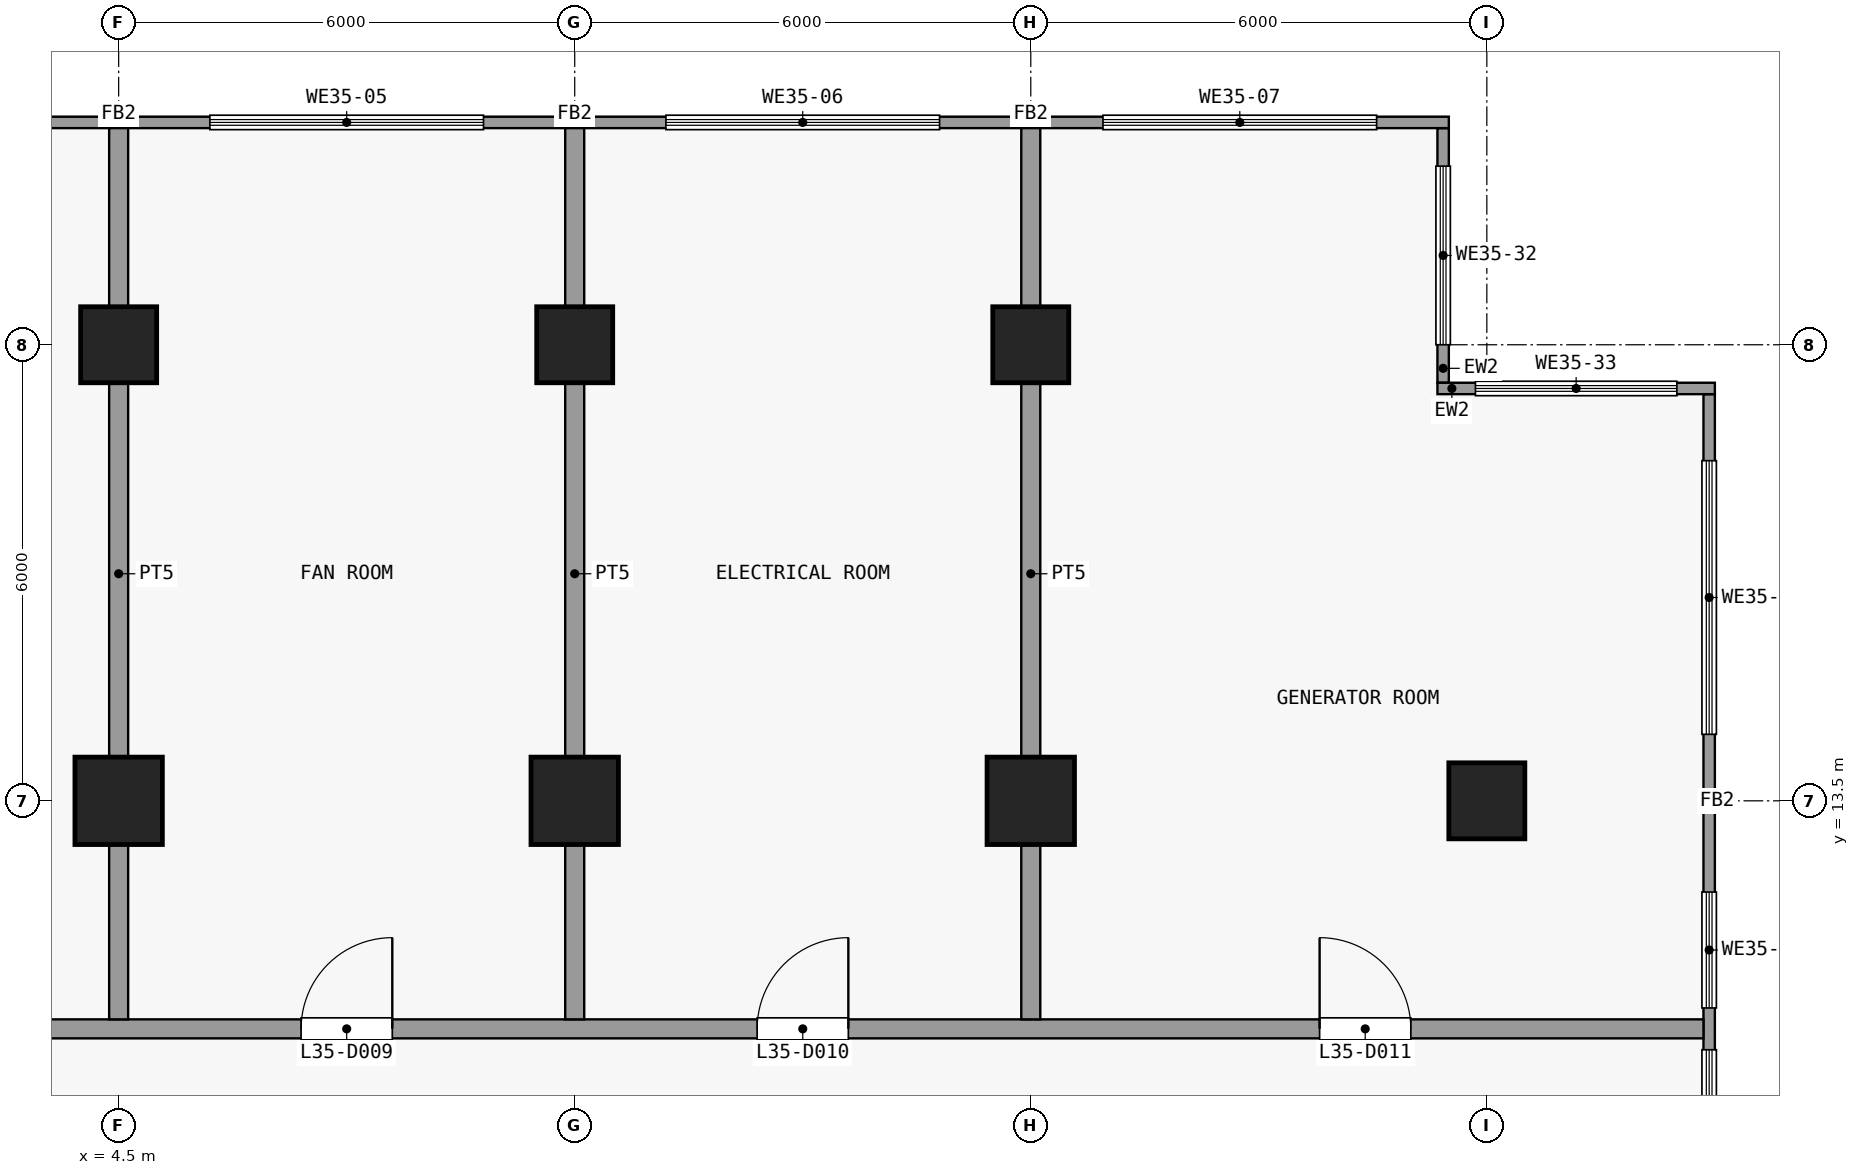
"""IFC4 building model, lengths in metres.
Left out: names, types, materials, properties, quantities, classifications, styles, units other than length and angle.
Written with IfcOpenShell. Run it as: python <this file> out.ifc"""

import sys

from ifc_helpers import new_model, si_unit, direction, frame, frame_2d, origin, origin_2d, place, context, subcontext, project, spatial, rectangle, extrude, element, fill, save


model = new_model("IFC4")
c1 = context("Model", 3, precision=1e-05, world=origin(), true_north=direction((0.0, 1.0)))
c2 = subcontext(c1, "Body", "Model", "MODEL_VIEW")
j1 = project(units=[si_unit("LENGTHUNIT", "METRE"), si_unit("PLANEANGLEUNIT", "RADIAN")], contexts=[c1])
p1 = place(None, origin())
s1 = spatial("IfcSite", under=j1, at=p1, CompositionType="ELEMENT")
p2 = place(p1, origin())
s2 = spatial("IfcBuilding", under=s1, at=p2, CompositionType="ELEMENT")
p3 = place(p2, frame((0.0, 0.0, 143.9)))
s3 = spatial("IfcBuildingStorey", under=s2, at=p3, CompositionType="ELEMENT", Elevation=143.9)
p4 = place(p3, frame((4.5, 13.5, 0.0), z_axis=(0.0, 0.0, 1.0), x_axis=(1.0, 0.0, 0.0)))
e1 = element("IfcColumn", 1, at=p4, inside=s3, PredefinedType="COLUMN", context=c2, shape_type="SweptSolid", body=[
    extrude(rectangle(XDim=1.15, YDim=1.15, at=origin_2d()), origin(), (0.0, 0.0, 1.0), 5.4),
])
p5 = place(p3, frame((4.5, 19.5, 0.0), z_axis=(0.0, 0.0, 1.0), x_axis=(1.0, 0.0, 0.0)))
e2 = element("IfcColumn", 2, at=p5, inside=s3, PredefinedType="COLUMN", context=c2, shape_type="SweptSolid", body=[
    extrude(rectangle(XDim=1.0, YDim=1.0, at=origin_2d()), origin(), (0.0, 0.0, 1.0), 5.4),
])
p6 = place(p3, frame((10.5, 13.5, 0.0), z_axis=(0.0, 0.0, 1.0), x_axis=(1.0, 0.0, 0.0)))
e3 = element("IfcColumn", 3, at=p6, inside=s3, PredefinedType="COLUMN", context=c2, shape_type="SweptSolid", body=[
    extrude(rectangle(XDim=1.15, YDim=1.15, at=origin_2d()), origin(), (0.0, 0.0, 1.0), 5.4),
])
p7 = place(p3, frame((10.5, 19.5, 0.0), z_axis=(0.0, 0.0, 1.0), x_axis=(1.0, 0.0, 0.0)))
e4 = element("IfcColumn", 4, at=p7, inside=s3, PredefinedType="COLUMN", context=c2, shape_type="SweptSolid", body=[
    extrude(rectangle(XDim=1.0, YDim=1.0, at=origin_2d()), origin(), (0.0, 0.0, 1.0), 5.4),
])
p8 = place(p3, frame((16.5, 13.5, 0.0), z_axis=(0.0, 0.0, 1.0), x_axis=(1.0, 0.0, 0.0)))
e5 = element("IfcColumn", 5, at=p8, inside=s3, PredefinedType="COLUMN", context=c2, shape_type="SweptSolid", body=[
    extrude(rectangle(XDim=1.15, YDim=1.15, at=origin_2d()), origin(), (0.0, 0.0, 1.0), 5.4),
])
for number, where, z_axis, x_axis in (
    (6, (16.5, 19.5, 0.0), (0.0, 0.0, 1.0), (1.0, 0.0, 0.0)),
    (7, (22.5, 13.5, 0.0), (0.0, 0.0, 1.0), (1.0, 0.0, 0.0)),
):
    element("IfcColumn", number, at=place(p3, frame(where, z_axis=z_axis, x_axis=x_axis)), inside=s3, PredefinedType="COLUMN", context=c2, shape_type="SweptSolid", body=[
        extrude(rectangle(XDim=1.0, YDim=1.0, at=origin_2d()), origin(), (0.0, 0.0, 1.0), 5.4),
    ])
p9 = place(p3, frame((-22.0, 22.425, 0.0), z_axis=(0.0, 0.0, 1.0), x_axis=(1.0, 0.0, 0.0)))
e8 = element("IfcWall", 8, at=p9, inside=s3, PredefinedType="SOLIDWALL", context=c2, shape_type="SweptSolid", body=[
    extrude(rectangle(XDim=44.0, YDim=0.15, at=frame_2d((22.0, 0.0))), origin(), (0.0, 0.0, 1.0), 5.0),
])
p10 = place(p9, frame((0.95, 0.0, 1.2)))
e9 = element("IfcOpeningElement", 9, at=p10, cuts=e8, PredefinedType="OPENING", context=c2, shape_type="SweptSolid", body=[
    extrude(rectangle(XDim=3.6, YDim=3.0, at=frame_2d((1.8, 1.5))), frame((0.0, 0.085, 0.0), z_axis=(0.0, -1.0, 0.0), x_axis=(1.0, 0.0, 0.0)), (0.0, 0.0, 1.0), 0.17),
])
p11 = place(p9, frame((6.7, 0.0, 1.2)))
e10 = element("IfcOpeningElement", 10, at=p11, cuts=e8, PredefinedType="OPENING", context=c2, shape_type="SweptSolid", body=[
    extrude(rectangle(XDim=3.6, YDim=3.0, at=frame_2d((1.8, 1.5))), frame((0.0, 0.085, 0.0), z_axis=(0.0, -1.0, 0.0), x_axis=(1.0, 0.0, 0.0)), (0.0, 0.0, 1.0), 0.17),
])
p12 = place(p9, frame((12.7, 0.0, 1.2)))
e11 = element("IfcOpeningElement", 11, at=p12, cuts=e8, PredefinedType="OPENING", context=c2, shape_type="SweptSolid", body=[
    extrude(rectangle(XDim=3.6, YDim=3.0, at=frame_2d((1.8, 1.5))), frame((0.0, 0.085, 0.0), z_axis=(0.0, -1.0, 0.0), x_axis=(1.0, 0.0, 0.0)), (0.0, 0.0, 1.0), 0.17),
])
p13 = place(p9, frame((20.2, 0.0, 1.2)))
e12 = element("IfcOpeningElement", 12, at=p13, cuts=e8, PredefinedType="OPENING", context=c2, shape_type="SweptSolid", body=[
    extrude(rectangle(XDim=3.6, YDim=3.0, at=frame_2d((1.8, 1.5))), frame((0.0, 0.085, 0.0), z_axis=(0.0, -1.0, 0.0), x_axis=(1.0, 0.0, 0.0)), (0.0, 0.0, 1.0), 0.17),
])
p14 = place(p9, frame((27.7, 0.0, 1.2)))
e13 = element("IfcOpeningElement", 13, at=p14, cuts=e8, PredefinedType="OPENING", context=c2, shape_type="SweptSolid", body=[
    extrude(rectangle(XDim=3.6, YDim=3.0, at=frame_2d((1.8, 1.5))), frame((0.0, 0.085, 0.0), z_axis=(0.0, -1.0, 0.0), x_axis=(1.0, 0.0, 0.0)), (0.0, 0.0, 1.0), 0.17),
])
p15 = place(p9, frame((33.7, 0.0, 1.2)))
e14 = element("IfcOpeningElement", 14, at=p15, cuts=e8, PredefinedType="OPENING", context=c2, shape_type="SweptSolid", body=[
    extrude(rectangle(XDim=3.6, YDim=3.0, at=frame_2d((1.8, 1.5))), frame((0.0, 0.085, 0.0), z_axis=(0.0, -1.0, 0.0), x_axis=(1.0, 0.0, 0.0)), (0.0, 0.0, 1.0), 0.17),
])
p16 = place(p9, frame((39.45, 0.0, 1.2)))
e15 = element("IfcOpeningElement", 15, at=p16, cuts=e8, PredefinedType="OPENING", context=c2, shape_type="SweptSolid", body=[
    extrude(rectangle(XDim=3.6, YDim=3.0, at=frame_2d((1.8, 1.5))), frame((0.0, 0.085, 0.0), z_axis=(0.0, -1.0, 0.0), x_axis=(1.0, 0.0, 0.0)), (0.0, 0.0, 1.0), 0.17),
])
p17 = place(p3, frame((25.425, 18.85, 0.0), z_axis=(0.0, 0.0, 1.0), x_axis=(0.0, -1.0, 0.0)))
e16 = element("IfcWall", 16, at=p17, inside=s3, PredefinedType="SOLIDWALL", context=c2, shape_type="SweptSolid", body=[
    extrude(rectangle(XDim=40.7, YDim=0.15, at=frame_2d((20.35, 0.0))), origin(), (0.0, 0.0, 1.0), 5.0),
])
p18 = place(p17, frame((34.725, 0.0, 1.2)))
e17 = element("IfcOpeningElement", 17, at=p18, cuts=e16, PredefinedType="OPENING", context=c2, shape_type="SweptSolid", body=[
    extrude(rectangle(XDim=3.6, YDim=3.0, at=frame_2d((1.8, 1.5))), frame((0.0, 0.085, 0.0), z_axis=(0.0, -1.0, 0.0), x_axis=(1.0, 0.0, 0.0)), (0.0, 0.0, 1.0), 0.17),
])
p19 = place(p17, frame((27.025, 0.0, 1.2)))
e18 = element("IfcOpeningElement", 18, at=p19, cuts=e16, PredefinedType="OPENING", context=c2, shape_type="SweptSolid", body=[
    extrude(rectangle(XDim=2.625, YDim=3.0, at=frame_2d((1.312, 1.5))), frame((0.0, 0.085, 0.0), z_axis=(0.0, -1.0, 0.0), x_axis=(1.0, 0.0, 0.0)), (0.0, 0.0, 1.0), 0.17),
])
p20 = place(p17, frame((18.55, 0.0, 1.2)))
e19 = element("IfcOpeningElement", 19, at=p20, cuts=e16, PredefinedType="OPENING", context=c2, shape_type="SweptSolid", body=[
    extrude(rectangle(XDim=3.6, YDim=3.0, at=frame_2d((1.8, 1.5))), frame((0.0, 0.085, 0.0), z_axis=(0.0, -1.0, 0.0), x_axis=(1.0, 0.0, 0.0)), (0.0, 0.0, 1.0), 0.17),
])
p21 = place(p17, frame((12.55, 0.0, 1.2)))
e20 = element("IfcOpeningElement", 20, at=p21, cuts=e16, PredefinedType="OPENING", context=c2, shape_type="SweptSolid", body=[
    extrude(rectangle(XDim=3.6, YDim=3.0, at=frame_2d((1.8, 1.5))), frame((0.0, 0.085, 0.0), z_axis=(0.0, -1.0, 0.0), x_axis=(1.0, 0.0, 0.0)), (0.0, 0.0, 1.0), 0.17),
])
p22 = place(p17, frame((8.625, 0.0, 1.2)))
e21 = element("IfcOpeningElement", 21, at=p22, cuts=e16, PredefinedType="OPENING", context=c2, shape_type="SweptSolid", body=[
    extrude(rectangle(XDim=1.525, YDim=3.0, at=frame_2d((0.762, 1.5))), frame((0.0, 0.085, 0.0), z_axis=(0.0, -1.0, 0.0), x_axis=(1.0, 0.0, 0.0)), (0.0, 0.0, 1.0), 0.17),
])
p23 = place(p17, frame((6.55, 0.0, 1.2)))
e22 = element("IfcOpeningElement", 22, at=p23, cuts=e16, PredefinedType="OPENING", context=c2, shape_type="SweptSolid", body=[
    extrude(rectangle(XDim=1.525, YDim=3.0, at=frame_2d((0.762, 1.5))), frame((0.0, 0.085, 0.0), z_axis=(0.0, -1.0, 0.0), x_axis=(1.0, 0.0, 0.0)), (0.0, 0.0, 1.0), 0.17),
])
p24 = place(p17, frame((0.875, 0.0, 1.2)))
e23 = element("IfcOpeningElement", 23, at=p24, cuts=e16, PredefinedType="OPENING", context=c2, shape_type="SweptSolid", body=[
    extrude(rectangle(XDim=3.6, YDim=3.0, at=frame_2d((1.8, 1.5))), frame((0.0, 0.085, 0.0), z_axis=(0.0, -1.0, 0.0), x_axis=(1.0, 0.0, 0.0)), (0.0, 0.0, 1.0), 0.17),
])
p25 = place(p3, frame((21.925, 22.35, 0.0), z_axis=(0.0, 0.0, 1.0), x_axis=(0.0, -1.0, 0.0)))
e24 = element("IfcWall", 24, at=p25, inside=s3, PredefinedType="SOLIDWALL", context=c2, shape_type="SweptSolid", body=[
    extrude(rectangle(XDim=3.35, YDim=0.15, at=frame_2d((1.675, 0.0))), origin(), (0.0, 0.0, 1.0), 5.0),
])
p26 = place(p25, frame((0.5, 0.0, 1.2)))
e25 = element("IfcOpeningElement", 25, at=p26, cuts=e24, PredefinedType="OPENING", context=c2, shape_type="SweptSolid", body=[
    extrude(rectangle(XDim=2.35, YDim=3.0, at=frame_2d((1.175, 1.5))), frame((0.0, 0.085, 0.0), z_axis=(0.0, -1.0, 0.0), x_axis=(1.0, 0.0, 0.0)), (0.0, 0.0, 1.0), 0.17),
])
p27 = place(p3, frame((21.85, 18.925, 0.0), z_axis=(0.0, 0.0, 1.0), x_axis=(1.0, 0.0, 0.0)))
e26 = element("IfcWall", 26, at=p27, inside=s3, PredefinedType="SOLIDWALL", context=c2, shape_type="SweptSolid", body=[
    extrude(rectangle(XDim=3.65, YDim=0.15, at=frame_2d((1.825, 0.0))), origin(), (0.0, 0.0, 1.0), 5.0),
])
p28 = place(p27, frame((0.5, 0.0, 1.2)))
e27 = element("IfcOpeningElement", 27, at=p28, cuts=e26, PredefinedType="OPENING", context=c2, shape_type="SweptSolid", body=[
    extrude(rectangle(XDim=2.65, YDim=3.0, at=frame_2d((1.325, 1.5))), frame((0.0, 0.085, 0.0), z_axis=(0.0, -1.0, 0.0), x_axis=(1.0, 0.0, 0.0)), (0.0, 0.0, 1.0), 0.17),
])
p29 = place(p3, frame((-25.35, 10.5, 0.0), z_axis=(0.0, 0.0, 1.0), x_axis=(1.0, 0.0, 0.0)))
e28 = element("IfcWall", 28, at=p29, inside=s3, PredefinedType="PARTITIONING", context=c2, shape_type="SweptSolid", body=[
    extrude(rectangle(XDim=50.7, YDim=0.25, at=frame_2d((25.35, 0.0))), origin(), (0.0, 0.0, 1.0), 5.0),
])
p30 = place(p29, frame((3.8, 0.0, 0.0)))
e29 = element("IfcOpeningElement", 29, at=p30, cuts=e28, PredefinedType="OPENING", context=c2, shape_type="SweptSolid", body=[
    extrude(rectangle(XDim=1.2, YDim=2.1, at=frame_2d((0.6, 1.05))), frame((0.0, 0.135, 0.0), z_axis=(0.0, -1.0, 0.0), x_axis=(1.0, 0.0, 0.0)), (0.0, 0.0, 1.0), 0.27),
])
p31 = place(p29, frame((11.25, 0.0, 0.0)))
e30 = element("IfcOpeningElement", 30, at=p31, cuts=e28, PredefinedType="OPENING", context=c2, shape_type="SweptSolid", body=[
    extrude(rectangle(XDim=1.2, YDim=2.1, at=frame_2d((0.6, 1.05))), frame((0.0, 0.135, 0.0), z_axis=(0.0, -1.0, 0.0), x_axis=(1.0, 0.0, 0.0)), (0.0, 0.0, 1.0), 0.27),
])
p32 = place(p29, frame((21.75, 0.0, 0.0)))
e31 = element("IfcOpeningElement", 31, at=p32, cuts=e28, PredefinedType="OPENING", context=c2, shape_type="SweptSolid", body=[
    extrude(rectangle(XDim=1.2, YDim=2.1, at=frame_2d((0.6, 1.05))), frame((0.0, 0.135, 0.0), z_axis=(0.0, -1.0, 0.0), x_axis=(1.0, 0.0, 0.0)), (0.0, 0.0, 1.0), 0.27),
])
p33 = place(p29, frame((32.25, 0.0, 0.0)))
e32 = element("IfcOpeningElement", 32, at=p33, cuts=e28, PredefinedType="OPENING", context=c2, shape_type="SweptSolid", body=[
    extrude(rectangle(XDim=1.2, YDim=2.1, at=frame_2d((0.6, 1.05))), frame((0.0, 0.135, 0.0), z_axis=(0.0, -1.0, 0.0), x_axis=(1.0, 0.0, 0.0)), (0.0, 0.0, 1.0), 0.27),
])
p34 = place(p29, frame((38.25, 0.0, 0.0)))
e33 = element("IfcOpeningElement", 33, at=p34, cuts=e28, PredefinedType="OPENING", context=c2, shape_type="SweptSolid", body=[
    extrude(rectangle(XDim=1.2, YDim=2.1, at=frame_2d((0.6, 1.05))), frame((0.0, 0.135, 0.0), z_axis=(0.0, -1.0, 0.0), x_axis=(1.0, 0.0, 0.0)), (0.0, 0.0, 1.0), 0.27),
])
p35 = place(p29, frame((45.65, 0.0, 0.0)))
e34 = element("IfcOpeningElement", 34, at=p35, cuts=e28, PredefinedType="OPENING", context=c2, shape_type="SweptSolid", body=[
    extrude(rectangle(XDim=1.2, YDim=2.1, at=frame_2d((0.6, 1.05))), frame((0.0, 0.135, 0.0), z_axis=(0.0, -1.0, 0.0), x_axis=(1.0, 0.0, 0.0)), (0.0, 0.0, 1.0), 0.27),
])
for number, where, z_axis, x_axis in (
    (35, (4.5, 10.625, 0.0), (0.0, 0.0, 1.0), (0.0, 1.0, 0.0)),
    (36, (10.5, 10.625, 0.0), (0.0, 0.0, 1.0), (0.0, 1.0, 0.0)),
    (37, (16.5, 10.625, 0.0), (0.0, 0.0, 1.0), (0.0, 1.0, 0.0)),
):
    element("IfcWall", number, at=place(p3, frame(where, z_axis=z_axis, x_axis=x_axis)), inside=s3, PredefinedType="PARTITIONING", context=c2, shape_type="SweptSolid", body=[
        extrude(rectangle(XDim=11.725, YDim=0.25, at=frame_2d((5.863, 0.0))), origin(), (0.0, 0.0, 1.0), 5.0),
    ])
p36 = place(p14, origin())
e38 = element("IfcWindow", 38, at=p36, inside=s3, PartitioningType="SINGLE_PANEL", PredefinedType="WINDOW", context=c2, shape_type="SweptSolid", body=[
    extrude(rectangle(XDim=3.6, YDim=3.0, at=frame_2d((1.8, 1.5))), frame((0.0, 0.03, 0.0), z_axis=(0.0, -1.0, 0.0), x_axis=(1.0, 0.0, 0.0)), (0.0, 0.0, 1.0), 0.06),
])
fill(e13, e38)
p37 = place(p15, origin())
e39 = element("IfcWindow", 39, at=p37, inside=s3, PartitioningType="SINGLE_PANEL", PredefinedType="WINDOW", context=c2, shape_type="SweptSolid", body=[
    extrude(rectangle(XDim=3.6, YDim=3.0, at=frame_2d((1.8, 1.5))), frame((0.0, 0.03, 0.0), z_axis=(0.0, -1.0, 0.0), x_axis=(1.0, 0.0, 0.0)), (0.0, 0.0, 1.0), 0.06),
])
fill(e14, e39)
p38 = place(p16, origin())
e40 = element("IfcWindow", 40, at=p38, inside=s3, PartitioningType="SINGLE_PANEL", PredefinedType="WINDOW", context=c2, shape_type="SweptSolid", body=[
    extrude(rectangle(XDim=3.6, YDim=3.0, at=frame_2d((1.8, 1.5))), frame((0.0, 0.03, 0.0), z_axis=(0.0, -1.0, 0.0), x_axis=(1.0, 0.0, 0.0)), (0.0, 0.0, 1.0), 0.06),
])
fill(e15, e40)
p39 = place(p22, origin())
e41 = element("IfcWindow", 41, at=p39, inside=s3, PartitioningType="SINGLE_PANEL", PredefinedType="WINDOW", context=c2, shape_type="SweptSolid", body=[
    extrude(rectangle(XDim=1.525, YDim=3.0, at=frame_2d((0.762, 1.5))), frame((0.0, 0.03, 0.0), z_axis=(0.0, -1.0, 0.0), x_axis=(1.0, 0.0, 0.0)), (0.0, 0.0, 1.0), 0.06),
])
fill(e21, e41)
p40 = place(p23, origin())
e42 = element("IfcWindow", 42, at=p40, inside=s3, PartitioningType="SINGLE_PANEL", PredefinedType="WINDOW", context=c2, shape_type="SweptSolid", body=[
    extrude(rectangle(XDim=1.525, YDim=3.0, at=frame_2d((0.762, 1.5))), frame((0.0, 0.03, 0.0), z_axis=(0.0, -1.0, 0.0), x_axis=(1.0, 0.0, 0.0)), (0.0, 0.0, 1.0), 0.06),
])
fill(e22, e42)
p41 = place(p24, origin())
e43 = element("IfcWindow", 43, at=p41, inside=s3, PartitioningType="SINGLE_PANEL", PredefinedType="WINDOW", context=c2, shape_type="SweptSolid", body=[
    extrude(rectangle(XDim=3.6, YDim=3.0, at=frame_2d((1.8, 1.5))), frame((0.0, 0.03, 0.0), z_axis=(0.0, -1.0, 0.0), x_axis=(1.0, 0.0, 0.0)), (0.0, 0.0, 1.0), 0.06),
])
fill(e23, e43)
p42 = place(p26, origin())
e44 = element("IfcWindow", 44, at=p42, inside=s3, PartitioningType="SINGLE_PANEL", PredefinedType="WINDOW", context=c2, shape_type="SweptSolid", body=[
    extrude(rectangle(XDim=2.35, YDim=3.0, at=frame_2d((1.175, 1.5))), frame((0.0, 0.03, 0.0), z_axis=(0.0, -1.0, 0.0), x_axis=(1.0, 0.0, 0.0)), (0.0, 0.0, 1.0), 0.06),
])
fill(e25, e44)
p43 = place(p28, origin())
e45 = element("IfcWindow", 45, at=p43, inside=s3, PartitioningType="SINGLE_PANEL", PredefinedType="WINDOW", context=c2, shape_type="SweptSolid", body=[
    extrude(rectangle(XDim=2.65, YDim=3.0, at=frame_2d((1.325, 1.5))), frame((0.0, 0.03, 0.0), z_axis=(0.0, -1.0, 0.0), x_axis=(1.0, 0.0, 0.0)), (0.0, 0.0, 1.0), 0.06),
])
fill(e27, e45)
p44 = place(p33, origin())
e46 = element("IfcDoor", 46, at=p44, inside=s3, OperationType="SINGLE_SWING_LEFT", PredefinedType="DOOR", context=c2, shape_type="SweptSolid", body=[
    extrude(rectangle(XDim=1.2, YDim=2.1, at=frame_2d((0.6, 1.05))), frame((0.0, 0.025, 0.0), z_axis=(0.0, -1.0, 0.0), x_axis=(1.0, 0.0, 0.0)), (0.0, 0.0, 1.0), 0.05),
])
fill(e32, e46)
p45 = place(p34, origin())
e47 = element("IfcDoor", 47, at=p45, inside=s3, OperationType="SINGLE_SWING_LEFT", PredefinedType="DOOR", context=c2, shape_type="SweptSolid", body=[
    extrude(rectangle(XDim=1.2, YDim=2.1, at=frame_2d((0.6, 1.05))), frame((0.0, 0.025, 0.0), z_axis=(0.0, -1.0, 0.0), x_axis=(1.0, 0.0, 0.0)), (0.0, 0.0, 1.0), 0.05),
])
fill(e33, e47)
p46 = place(p35, origin())
e48 = element("IfcDoor", 48, at=p46, inside=s3, OperationType="SINGLE_SWING_RIGHT", PredefinedType="DOOR", context=c2, shape_type="SweptSolid", body=[
    extrude(rectangle(XDim=1.2, YDim=2.1, at=frame_2d((0.6, 1.05))), frame((0.0, 0.025, 0.0), z_axis=(0.0, -1.0, 0.0), x_axis=(1.0, 0.0, 0.0)), (0.0, 0.0, 1.0), 0.05),
])
fill(e34, e48)
save(model, sys.argv[1])
